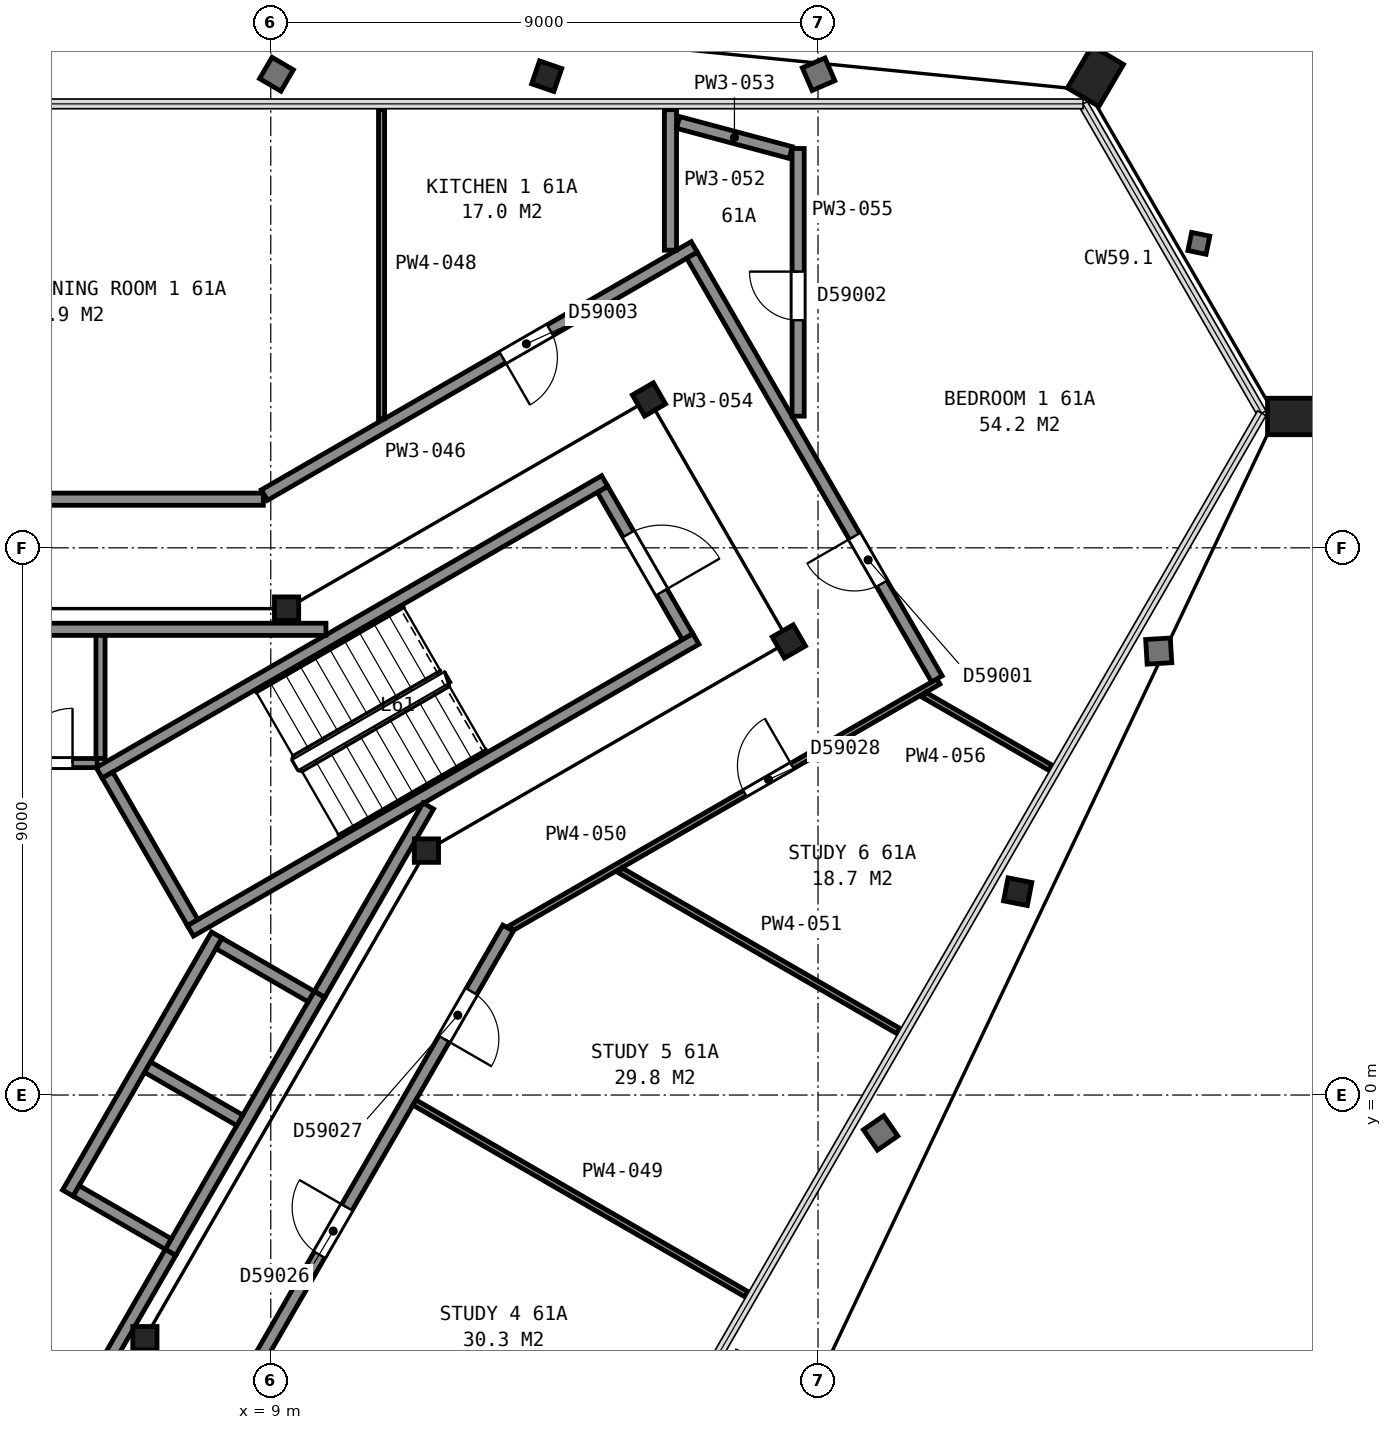
"""IFC4 building model, lengths in metres.
Left out: names, types, materials, properties, quantities, classifications, styles, units other than length and angle.
Written with IfcOpenShell. Run it as: python <this file> out.ifc"""

import sys

from ifc_helpers import new_model, si_unit, direction, frame, frame_2d, origin, origin_2d, place, context, subcontext, project, spatial, rectangle, hollow_rectangle, i_section, extrude, element, fill, save


model = new_model("IFC4")
c1 = context("Model", 3, precision=1e-05, world=origin(), true_north=direction((0.0, 1.0)))
c2 = subcontext(c1, "Body", "Model", "MODEL_VIEW")
j1 = project(units=[si_unit("LENGTHUNIT", "METRE"), si_unit("PLANEANGLEUNIT", "RADIAN")], contexts=[c1])
p1 = place(None, origin())
s1 = spatial("IfcSite", under=j1, at=p1, CompositionType="ELEMENT")
p2 = place(p1, origin())
s2 = spatial("IfcBuilding", under=s1, at=p2, CompositionType="ELEMENT")
p3 = place(p2, frame((0.0, 0.0, 243.4)))
s3 = spatial("IfcBuildingStorey", under=s2, at=p3, CompositionType="ELEMENT", Elevation=243.4)
p4 = place(p3, frame((22.437, 16.542, 0.065), z_axis=(0.108220616639, 0.184843485334, 0.976791269445), x_axis=(0.497243302429, -0.86088562472, 0.107819475699)))
e1 = element("IfcColumn", 1, at=p4, inside=s3, PredefinedType="COLUMN", context=c2, shape_type="SweptSolid", body=[
    extrude(hollow_rectangle(XDim=0.6, YDim=0.8, WallThickness=0.05, at=origin_2d()), origin(), (0.0, 0.0, 1.0), 3.655),
])
p5 = place(p3, frame((13.462, 16.537, 0.035), z_axis=(0.063578143467, 0.185524188354, 0.98058074385), x_axis=(0.997902892786, 0.000144647774, -0.064728630807)))
e2 = element("IfcColumn", 2, at=p5, inside=s3, PredefinedType="COLUMN", context=c2, shape_type="SweptSolid", body=[
    extrude(i_section(OverallWidth=0.399, OverallDepth=0.386, WebThickness=0.021, FlangeThickness=0.033, FilletRadius=0.015, at=origin_2d()), origin(), (0.0, 0.0, 1.0), 3.702),
])
p6 = place(p3, frame((16.566, -4.383, 0.035), z_axis=(0.172550127642, -0.074384166817, 0.982188092566), x_axis=(-0.500108020801, -0.865675893993, 0.022298297935)))
e3 = element("IfcColumn", 3, at=p6, inside=s3, PredefinedType="COLUMN", context=c2, shape_type="SweptSolid", body=[
    extrude(i_section(OverallWidth=0.399, OverallDepth=0.386, WebThickness=0.021, FlangeThickness=0.033, FilletRadius=0.015, at=origin_2d()), origin(), (0.0, 0.0, 1.0), 3.696),
])
p7 = place(p3, frame((21.057, 3.389, 0.035), z_axis=(0.190865086691, -0.037143810511, 0.980913276505), x_axis=(-0.499098485542, -0.864149530605, 0.064391695786)))
e4 = element("IfcColumn", 4, at=p7, inside=s3, PredefinedType="COLUMN", context=c2, shape_type="SweptSolid", body=[
    extrude(i_section(OverallWidth=0.399, OverallDepth=0.386, WebThickness=0.021, FlangeThickness=0.033, FilletRadius=0.015, at=origin_2d()), origin(), (0.0, 0.0, 1.0), 3.7),
])
p8 = place(p3, frame((25.544, 11.16, 0.065), z_axis=(0.213852283996, 0.0, 0.976866009558), x_axis=(0.497031900956, -0.860883256594, -0.10880858398)))
e5 = element("IfcColumn", 5, at=p8, inside=s3, PredefinedType="COLUMN", context=c2, shape_type="SweptSolid", body=[
    extrude(hollow_rectangle(XDim=0.6, YDim=0.8, WallThickness=0.05, at=origin_2d()), origin(), (0.0, 0.0, 1.0), 3.654),
])
p9 = place(p3, frame((11.56, 4.02, 0.0), z_axis=(0.0, 0.0, 1.0), x_axis=(1.0, 0.0, 0.0)))
e6 = element("IfcColumn", 6, at=p9, inside=s3, PredefinedType="COLUMN", context=c2, shape_type="SweptSolid", body=[
    extrude(i_section(OverallWidth=0.399, OverallDepth=0.386, WebThickness=0.021, FlangeThickness=0.033, FilletRadius=0.015, at=origin_2d()), origin(), (0.0, 0.0, 1.0), 3.7),
])
for number, where, z_axis, x_axis in (
    (7, (17.52, 7.46, 0.0), (0.0, 0.0, 1.0), (0.5, -0.866, 0.0)),
    (8, (15.22, 11.44, 0.0), (0.0, 0.0, 1.0), (0.5, -0.866, 0.0)),
):
    element("IfcColumn", number, at=place(p3, frame(where, z_axis=z_axis, x_axis=x_axis)), inside=s3, PredefinedType="COLUMN", context=c2, shape_type="SweptSolid", body=[
        extrude(i_section(OverallWidth=0.401, OverallDepth=0.399, WebThickness=0.025, FlangeThickness=0.04, FilletRadius=0.015, at=origin_2d()), origin(), (0.0, 0.0, 1.0), 3.7),
    ])
for number, where, z_axis, x_axis in (
    (9, (9.26, 8.0, 0.0), (0.0, 0.0, 1.0), (1.0, 0.0, 0.0)),
    (10, (6.93, -4.0, 0.0), (0.0, 0.0, 1.0), (1.0, 0.0, 0.0)),
):
    element("IfcColumn", number, at=place(p3, frame(where, z_axis=z_axis, x_axis=x_axis)), inside=s3, PredefinedType="COLUMN", context=c2, shape_type="SweptSolid", body=[
        extrude(i_section(OverallWidth=0.399, OverallDepth=0.386, WebThickness=0.021, FlangeThickness=0.033, FilletRadius=0.015, at=origin_2d()), origin(), (0.0, 0.0, 1.0), 3.7),
    ])
p10 = place(p3, frame((15.855, 7.538, 0.0), z_axis=(0.0, 0.0, 1.0), x_axis=(-0.500049511043, 0.865996816683, 0.0)))
e11 = element("IfcWall", 11, at=p10, inside=s3, PredefinedType="PARTITIONING", context=c2, shape_type="SweptSolid", body=[
    extrude(rectangle(XDim=2.8, YDim=0.2, at=frame_2d((1.4, 0.0))), origin(), (0.0, 0.0, 1.0), 3.45),
])
p11 = place(p10, frame((0.85, 0.0, 0.0)))
e12 = element("IfcOpeningElement", 12, at=p11, cuts=e11, PredefinedType="OPENING", context=c2, shape_type="SweptSolid", body=[
    extrude(rectangle(XDim=1.1, YDim=2.1, at=frame_2d((0.55, 1.05))), frame((0.0, 0.11, 0.0), z_axis=(0.0, -1.0, 0.0), x_axis=(1.0, 0.0, 0.0)), (0.0, 0.0, 1.0), 0.22),
])
for number, where, z_axis, x_axis in (
    (13, (6.178, 5.299, 0.0), (0.0, 0.0, 1.0), (0.866, 0.5, 0.0)),
    (14, (7.678, 2.701, 0.0), (0.0, 0.0, 1.0), (0.866, 0.5, 0.0)),
):
    element("IfcWall", number, at=place(p3, frame(where, z_axis=z_axis, x_axis=x_axis)), inside=s3, PredefinedType="PARTITIONING", context=c2, shape_type="SweptSolid", body=[
        extrude(rectangle(XDim=9.6, YDim=0.2, at=frame_2d((4.8, 0.0))), origin(), (0.0, 0.0, 1.0), 3.45),
    ])
p12 = place(p3, frame((7.715, 2.838, 0.0), z_axis=(0.0, 0.0, 1.0), x_axis=(-0.500049511043, 0.865996816683, 0.0)))
e15 = element("IfcWall", 15, at=p12, inside=s3, PredefinedType="PARTITIONING", context=c2, shape_type="SweptSolid", body=[
    extrude(rectangle(XDim=2.8, YDim=0.2, at=frame_2d((1.4, 0.0))), origin(), (0.0, 0.0, 1.0), 3.45),
])
p13 = place(p3, frame((7.351, -2.587, 0.0), z_axis=(0.0, 0.0, 1.0), x_axis=(0.500002801628, 0.866023786258, 0.0)))
e16 = element("IfcWall", 16, at=p13, inside=s3, PredefinedType="PARTITIONING", context=c2, shape_type="SweptSolid", body=[
    extrude(rectangle(XDim=4.9, YDim=0.2, at=frame_2d((2.45, 0.0))), origin(), (0.0, 0.0, 1.0), 3.7),
])
p14 = place(p3, frame((5.663, -1.612, 0.0), z_axis=(0.0, 0.0, 1.0), x_axis=(0.49998122708, 0.866036242063, 0.0)))
e17 = element("IfcWall", 17, at=p14, inside=s3, PredefinedType="PARTITIONING", context=c2, shape_type="SweptSolid", body=[
    extrude(rectangle(XDim=4.9, YDim=0.2, at=frame_2d((2.45, 0.0))), origin(), (0.0, 0.0, 1.0), 3.7),
])
p15 = place(p3, frame((9.665, 1.62, 0.0), z_axis=(0.0, 0.0, 1.0), x_axis=(-0.866002029911, 0.500040482552, 0.0)))
e18 = element("IfcWall", 18, at=p15, inside=s3, PredefinedType="PARTITIONING", context=c2, shape_type="SweptSolid", body=[
    extrude(rectangle(XDim=1.75, YDim=0.2, at=frame_2d((0.875, 0.0))), origin(), (0.0, 0.0, 1.0), 3.7),
])
for number, where, z_axis, x_axis in (
    (19, (8.49, -0.416, 0.0), (0.0, 0.0, 1.0), (-0.866, 0.5, 0.0)),
    (20, (7.315, -2.451, 0.0), (0.0, 0.0, 1.0), (-0.866, 0.5, 0.0)),
):
    element("IfcWall", number, at=place(p3, frame(where, z_axis=z_axis, x_axis=x_axis)), inside=s3, PredefinedType="PARTITIONING", context=c2, shape_type="SweptSolid", body=[
        extrude(rectangle(XDim=1.75, YDim=0.2, at=frame_2d((0.875, 0.0))), origin(), (0.0, 0.0, 1.0), 3.7),
    ])
p16 = place(p3, frame((5.905, -4.893, 0.0), z_axis=(0.0, 0.0, 1.0), x_axis=(-0.866002029911, 0.500040482552, 0.0)))
e21 = element("IfcWall", 21, at=p16, inside=s3, PredefinedType="PARTITIONING", context=c2, shape_type="SweptSolid", body=[
    extrude(rectangle(XDim=1.75, YDim=0.2, at=frame_2d((0.875, 0.0))), origin(), (0.0, 0.0, 1.0), 3.7),
])
p17 = place(p3, frame((-3.933, 7.66, 0.0), z_axis=(0.0, 0.0, 1.0), x_axis=(1.0, 0.0, 0.0)))
e22 = element("IfcWall", 22, at=p17, inside=s3, PredefinedType="PARTITIONING", context=c2, shape_type="SweptSolid", body=[
    extrude(rectangle(XDim=13.841, YDim=0.2, at=frame_2d((6.92, 0.0))), origin(), (0.0, 0.0, 1.0), 3.45),
])
p18 = place(p3, frame((0.925, 5.46, 0.0), z_axis=(0.0, 0.0, 1.0), x_axis=(1.0, 0.0, 0.0)))
e23 = element("IfcWall", 23, at=p18, inside=s3, PredefinedType="PARTITIONING", context=c2, shape_type="SweptSolid", body=[
    extrude(rectangle(XDim=5.22, YDim=0.15, at=frame_2d((2.61, 0.0))), origin(), (0.0, 0.0, 1.0), 3.45),
])
p19 = place(p18, frame((3.915, 0.0, 0.0)))
e24 = element("IfcOpeningElement", 24, at=p19, cuts=e23, PredefinedType="OPENING", context=c2, shape_type="SweptSolid", body=[
    extrude(rectangle(XDim=0.9, YDim=2.1, at=frame_2d((0.45, 1.05))), frame((0.0, 0.085, 0.0), z_axis=(0.0, -1.0, 0.0), x_axis=(1.0, 0.0, 0.0)), (0.0, 0.0, 1.0), 0.17),
])
p20 = place(p3, frame((6.042, -4.855, 0.0), z_axis=(0.0, 0.0, 1.0), x_axis=(0.500252727967, 0.865879442048, 0.0)))
e25 = element("IfcWall", 25, at=p20, inside=s3, PredefinedType="PARTITIONING", context=c2, shape_type="SweptSolid", body=[
    extrude(rectangle(XDim=2.617, YDim=0.2, at=frame_2d((1.309, 0.0))), origin(), (0.0, 0.0, 1.0), 3.45),
])
p21 = place(p3, frame((6.2, 5.535, 0.0), z_axis=(0.0, 0.0, 1.0), x_axis=(0.0, 1.0, 0.0)))
e26 = element("IfcWall", 26, at=p21, inside=s3, PredefinedType="PARTITIONING", context=c2, shape_type="SweptSolid", body=[
    extrude(rectangle(XDim=2.025, YDim=0.15, at=frame_2d((1.013, 0.0))), origin(), (0.0, 0.0, 1.0), 3.45),
])
p22 = place(p3, frame((9.803, 1.658, 0.0), z_axis=(0.0, 0.0, 1.0), x_axis=(0.499943114462, 0.866058244174, 0.0)))
e27 = element("IfcWall", 27, at=p22, inside=s3, PredefinedType="PARTITIONING", context=c2, shape_type="SweptSolid", body=[
    extrude(rectangle(XDim=3.576, YDim=0.2, at=frame_2d((1.788, 0.0))), origin(), (0.0, 0.0, 1.0), 3.45),
])
p23 = place(p3, frame((-8.878, 9.8, 0.0), z_axis=(0.0, 0.0, 1.0), x_axis=(1.0, 0.0, 0.0)))
e28 = element("IfcWall", 28, at=p23, inside=s3, PredefinedType="PARTITIONING", context=c2, shape_type="SweptSolid", body=[
    extrude(rectangle(XDim=17.756, YDim=0.2, at=frame_2d((8.878, 0.0))), origin(), (0.0, 0.0, 1.0), 2.713),
])
p24 = place(p23, frame((12.792, 0.0, 0.0)))
e29 = element("IfcOpeningElement", 29, at=p24, cuts=e28, PredefinedType="OPENING", context=c2, shape_type="SweptSolid", body=[
    extrude(rectangle(XDim=1.2, YDim=2.1, at=frame_2d((0.6, 1.05))), frame((0.0, 0.11, 0.0), z_axis=(0.0, -1.0, 0.0), x_axis=(1.0, 0.0, 0.0)), (0.0, 0.0, 1.0), 0.22),
])
p25 = place(p23, frame((5.013, 0.0, 0.0)))
e30 = element("IfcOpeningElement", 30, at=p25, cuts=e28, PredefinedType="OPENING", context=c2, shape_type="SweptSolid", body=[
    extrude(rectangle(XDim=0.9, YDim=2.1, at=frame_2d((0.45, 1.05))), frame((0.0, 0.11, 0.0), z_axis=(0.0, -1.0, 0.0), x_axis=(1.0, 0.0, 0.0)), (0.0, 0.0, 1.0), 0.22),
])
p26 = place(p23, frame((1.834, 0.0, 0.0)))
e31 = element("IfcOpeningElement", 31, at=p26, cuts=e28, PredefinedType="OPENING", context=c2, shape_type="SweptSolid", body=[
    extrude(rectangle(XDim=0.9, YDim=2.1, at=frame_2d((0.45, 1.05))), frame((0.0, 0.11, 0.0), z_axis=(0.0, -1.0, 0.0), x_axis=(1.0, 0.0, 0.0)), (0.0, 0.0, 1.0), 0.22),
])
p27 = place(p3, frame((12.903, 2.745, 0.0), z_axis=(0.0, 0.0, 1.0), x_axis=(-0.499997769292, -0.86602669168, 0.0)))
e32 = element("IfcWall", 32, at=p27, inside=s3, PredefinedType="PARTITIONING", context=c2, shape_type="SweptSolid", body=[
    extrude(rectangle(XDim=17.706, YDim=0.2, at=frame_2d((8.853, 0.0))), origin(), (0.0, 0.0, 1.0), 2.713),
])
p28 = place(p27, frame((14.637, 0.0, 0.0)))
e33 = element("IfcOpeningElement", 33, at=p28, cuts=e32, PredefinedType="OPENING", context=c2, shape_type="SweptSolid", body=[
    extrude(rectangle(XDim=0.9, YDim=2.1, at=frame_2d((0.45, 1.05))), frame((0.0, 0.11, 0.0), z_axis=(0.0, -1.0, 0.0), x_axis=(1.0, 0.0, 0.0)), (0.0, 0.0, 1.0), 0.22),
])
p29 = place(p27, frame((11.858, 0.0, 0.0)))
e34 = element("IfcOpeningElement", 34, at=p29, cuts=e32, PredefinedType="OPENING", context=c2, shape_type="SweptSolid", body=[
    extrude(rectangle(XDim=0.9, YDim=2.1, at=frame_2d((0.45, 1.05))), frame((0.0, 0.11, 0.0), z_axis=(0.0, -1.0, 0.0), x_axis=(1.0, 0.0, 0.0)), (0.0, 0.0, 1.0), 0.22),
])
p30 = place(p27, frame((5.303, 0.0, 0.0)))
e35 = element("IfcOpeningElement", 35, at=p30, cuts=e32, PredefinedType="OPENING", context=c2, shape_type="SweptSolid", body=[
    extrude(rectangle(XDim=0.9, YDim=2.1, at=frame_2d((0.45, 1.05))), frame((0.0, 0.11, 0.0), z_axis=(0.0, -1.0, 0.0), x_axis=(1.0, 0.0, 0.0)), (0.0, 0.0, 1.0), 0.22),
])
p31 = place(p27, frame((1.204, 0.0, 0.0)))
e36 = element("IfcOpeningElement", 36, at=p31, cuts=e32, PredefinedType="OPENING", context=c2, shape_type="SweptSolid", body=[
    extrude(rectangle(XDim=0.9, YDim=2.1, at=frame_2d((0.45, 1.05))), frame((0.0, 0.11, 0.0), z_axis=(0.0, -1.0, 0.0), x_axis=(1.0, 0.0, 0.0)), (0.0, 0.0, 1.0), 0.22),
])
p32 = place(p3, frame((8.895, 9.867, 0.0), z_axis=(0.0, 0.0, 1.0), x_axis=(0.866081499088, 0.499902827495, 0.0)))
e37 = element("IfcWall", 37, at=p32, inside=s3, PredefinedType="PARTITIONING", context=c2, shape_type="SweptSolid", body=[
    extrude(rectangle(XDim=8.163, YDim=0.2, at=frame_2d((4.081, 0.0))), origin(), (0.0, 0.0, 1.0), 2.713),
])
p33 = place(p32, frame((4.525, 0.0, 0.0)))
e38 = element("IfcOpeningElement", 38, at=p33, cuts=e37, PredefinedType="OPENING", context=c2, shape_type="SweptSolid", body=[
    extrude(rectangle(XDim=0.9, YDim=2.1, at=frame_2d((0.45, 1.05))), frame((0.0, 0.11, 0.0), z_axis=(0.0, -1.0, 0.0), x_axis=(1.0, 0.0, 0.0)), (0.0, 0.0, 1.0), 0.22),
])
p34 = place(p3, frame((10.822, 11.124, 0.0), z_axis=(0.0, 0.0, 1.0), x_axis=(0.0, 1.0, 0.0)))
e39 = element("IfcWall", 39, at=p34, inside=s3, PredefinedType="PARTITIONING", context=c2, shape_type="SweptSolid", body=[
    extrude(rectangle(XDim=5.082, YDim=0.1, at=frame_2d((2.541, 0.0))), origin(), (0.0, 0.0, 1.0), 2.713),
])
p35 = place(p3, frame((11.363, -0.123, 0.0), z_axis=(0.0, 0.0, 1.0), x_axis=(0.866027573341, -0.4999962422, 0.0)))
e40 = element("IfcWall", 40, at=p35, inside=s3, PredefinedType="PARTITIONING", context=c2, shape_type="SweptSolid", body=[
    extrude(rectangle(XDim=6.304, YDim=0.1, at=frame_2d((3.152, 0.0))), origin(), (0.0, 0.0, 1.0), 2.713),
])
p36 = place(p3, frame((19.98, 6.801, 0.0), z_axis=(0.0, 0.0, 1.0), x_axis=(-0.866087400697, -0.49989260282, 0.0)))
e41 = element("IfcWall", 41, at=p36, inside=s3, PredefinedType="PARTITIONING", context=c2, shape_type="SweptSolid", body=[
    extrude(rectangle(XDim=8.115, YDim=0.1, at=frame_2d((4.058, 0.0))), origin(), (0.0, 0.0, 1.0), 2.713),
])
p37 = place(p36, frame((2.777, 0.0, 0.0)))
e42 = element("IfcOpeningElement", 42, at=p37, cuts=e41, PredefinedType="OPENING", context=c2, shape_type="SweptSolid", body=[
    extrude(rectangle(XDim=0.9, YDim=2.1, at=frame_2d((0.45, 1.05))), frame((0.0, 0.06, 0.0), z_axis=(0.0, -1.0, 0.0), x_axis=(1.0, 0.0, 0.0)), (0.0, 0.0, 1.0), 0.12),
])
p38 = place(p3, frame((14.748, 3.695, 0.0), z_axis=(0.0, 0.0, 1.0), x_axis=(0.86599232748, -0.500057285464, 0.0)))
e43 = element("IfcWall", 43, at=p38, inside=s3, PredefinedType="PARTITIONING", context=c2, shape_type="SweptSolid", body=[
    extrude(rectangle(XDim=5.281, YDim=0.1, at=frame_2d((2.64, 0.0))), origin(), (0.0, 0.0, 1.0), 2.713),
])
p39 = place(p3, frame((15.573, 13.895, 0.0), z_axis=(0.0, 0.0, 1.0), x_axis=(0.0, 1.0, 0.0)))
e44 = element("IfcWall", 44, at=p39, inside=s3, PredefinedType="PARTITIONING", context=c2, shape_type="SweptSolid", body=[
    extrude(rectangle(XDim=2.311, YDim=0.2, at=frame_2d((1.155, 0.0))), origin(), (0.0, 0.0, 1.0), 2.713),
])
p40 = place(p3, frame((15.699, 15.996, 0.0), z_axis=(0.0, 0.0, 1.0), x_axis=(0.96599800534, -0.258549518816, 0.0)))
e45 = element("IfcWall", 45, at=p40, inside=s3, PredefinedType="PARTITIONING", context=c2, shape_type="SweptSolid", body=[
    extrude(rectangle(XDim=1.919, YDim=0.2, at=frame_2d((0.959, 0.0))), origin(), (0.0, 0.0, 1.0), 2.713),
])
p41 = place(p3, frame((15.928, 13.812, 0.0), z_axis=(0.0, 0.0, 1.0), x_axis=(0.500422653123, -0.865781247337, 0.0)))
e46 = element("IfcWall", 46, at=p41, inside=s3, PredefinedType="PARTITIONING", context=c2, shape_type="SweptSolid", body=[
    extrude(rectangle(XDim=8.047, YDim=0.2, at=frame_2d((4.024, 0.0))), origin(), (0.0, 0.0, 1.0), 2.713),
])
p42 = place(p41, frame((5.337, 0.0, 0.0)))
e47 = element("IfcOpeningElement", 47, at=p42, cuts=e46, PredefinedType="OPENING", context=c2, shape_type="SweptSolid", body=[
    extrude(rectangle(XDim=0.9, YDim=2.1, at=frame_2d((0.45, 1.05))), frame((0.0, 0.11, 0.0), z_axis=(0.0, -1.0, 0.0), x_axis=(1.0, 0.0, 0.0)), (0.0, 0.0, 1.0), 0.22),
])
p43 = place(p3, frame((17.673, 11.166, 0.0), z_axis=(0.0, 0.0, 1.0), x_axis=(0.0, 1.0, 0.0)))
e48 = element("IfcWall", 48, at=p43, inside=s3, PredefinedType="PARTITIONING", context=c2, shape_type="SweptSolid", body=[
    extrude(rectangle(XDim=4.402, YDim=0.2, at=frame_2d((2.201, 0.0))), origin(), (0.0, 0.0, 1.0), 2.713),
])
p44 = place(p43, frame((1.577, 0.0, 0.0)))
e49 = element("IfcOpeningElement", 49, at=p44, cuts=e48, PredefinedType="OPENING", context=c2, shape_type="SweptSolid", body=[
    extrude(rectangle(XDim=0.8, YDim=2.1, at=frame_2d((0.4, 1.05))), frame((0.0, 0.11, 0.0), z_axis=(0.0, -1.0, 0.0), x_axis=(1.0, 0.0, 0.0)), (0.0, 0.0, 1.0), 0.22),
])
p45 = place(p3, frame((19.747, 6.581, 0.0), z_axis=(0.0, 0.0, 1.0), x_axis=(0.866139751882, -0.499801890962, 0.0)))
e50 = element("IfcWall", 50, at=p45, inside=s3, PredefinedType="PARTITIONING", context=c2, shape_type="SweptSolid", body=[
    extrude(rectangle(XDim=2.395, YDim=0.1, at=frame_2d((1.197, 0.0))), origin(), (0.0, 0.0, 1.0), 2.713),
])
p46 = place(p11, origin())
e51 = element("IfcDoor", 51, at=p46, inside=s3, OperationType="SINGLE_SWING_LEFT", PredefinedType="DOOR", context=c2, shape_type="SweptSolid", body=[
    extrude(rectangle(XDim=1.1, YDim=2.1, at=frame_2d((0.55, 1.05))), frame((0.0, 0.025, 0.0), z_axis=(0.0, -1.0, 0.0), x_axis=(1.0, 0.0, 0.0)), (0.0, 0.0, 1.0), 0.05),
])
fill(e12, e51)
p47 = place(p19, origin())
e52 = element("IfcDoor", 52, at=p47, inside=s3, OperationType="SINGLE_SWING_RIGHT", PredefinedType="DOOR", context=c2, shape_type="SweptSolid", body=[
    extrude(rectangle(XDim=0.9, YDim=2.1, at=frame_2d((0.45, 1.05))), frame((0.0, 0.025, 0.0), z_axis=(0.0, -1.0, 0.0), x_axis=(1.0, 0.0, 0.0)), (0.0, 0.0, 1.0), 0.05),
])
fill(e24, e52)
p48 = place(p30, origin())
e53 = element("IfcDoor", 53, at=p48, inside=s3, OperationType="SINGLE_SWING_LEFT", PredefinedType="DOOR", context=c2, shape_type="SweptSolid", body=[
    extrude(rectangle(XDim=0.9, YDim=2.1, at=frame_2d((0.45, 1.05))), frame((0.0, 0.025, 0.0), z_axis=(0.0, -1.0, 0.0), x_axis=(1.0, 0.0, 0.0)), (0.0, 0.0, 1.0), 0.05),
])
fill(e35, e53)
p49 = place(p31, origin())
e54 = element("IfcDoor", 54, at=p49, inside=s3, OperationType="SINGLE_SWING_RIGHT", PredefinedType="DOOR", context=c2, shape_type="SweptSolid", body=[
    extrude(rectangle(XDim=0.9, YDim=2.1, at=frame_2d((0.45, 1.05))), frame((0.0, 0.025, 0.0), z_axis=(0.0, -1.0, 0.0), x_axis=(1.0, 0.0, 0.0)), (0.0, 0.0, 1.0), 0.05),
])
fill(e36, e54)
p50 = place(p33, origin())
e55 = element("IfcDoor", 55, at=p50, inside=s3, OperationType="SINGLE_SWING_LEFT", PredefinedType="DOOR", context=c2, shape_type="SweptSolid", body=[
    extrude(rectangle(XDim=0.9, YDim=2.1, at=frame_2d((0.45, 1.05))), frame((0.0, 0.025, 0.0), z_axis=(0.0, -1.0, 0.0), x_axis=(1.0, 0.0, 0.0)), (0.0, 0.0, 1.0), 0.05),
])
fill(e38, e55)
p51 = place(p37, origin())
e56 = element("IfcDoor", 56, at=p51, inside=s3, OperationType="SINGLE_SWING_LEFT", PredefinedType="DOOR", context=c2, shape_type="SweptSolid", body=[
    extrude(rectangle(XDim=0.9, YDim=2.1, at=frame_2d((0.45, 1.05))), frame((0.0, 0.025, 0.0), z_axis=(0.0, -1.0, 0.0), x_axis=(1.0, 0.0, 0.0)), (0.0, 0.0, 1.0), 0.05),
])
fill(e42, e56)
p52 = place(p42, origin())
e57 = element("IfcDoor", 57, at=p52, inside=s3, OperationType="SINGLE_SWING_LEFT", PredefinedType="DOOR", context=c2, shape_type="SweptSolid", body=[
    extrude(rectangle(XDim=0.9, YDim=2.1, at=frame_2d((0.45, 1.05))), frame((0.0, 0.025, 0.0), z_axis=(0.0, -1.0, 0.0), x_axis=(1.0, 0.0, 0.0)), (0.0, 0.0, 1.0), 0.05),
])
fill(e47, e57)
p53 = place(p44, origin())
e58 = element("IfcDoor", 58, at=p53, inside=s3, OperationType="SINGLE_SWING_RIGHT", PredefinedType="DOOR", context=c2, shape_type="SweptSolid", body=[
    extrude(rectangle(XDim=0.8, YDim=2.1, at=frame_2d((0.4, 1.05))), frame((0.0, 0.025, 0.0), z_axis=(0.0, -1.0, 0.0), x_axis=(1.0, 0.0, 0.0)), (0.0, 0.0, 1.0), 0.05),
])
fill(e49, e58)
save(model, sys.argv[1])
